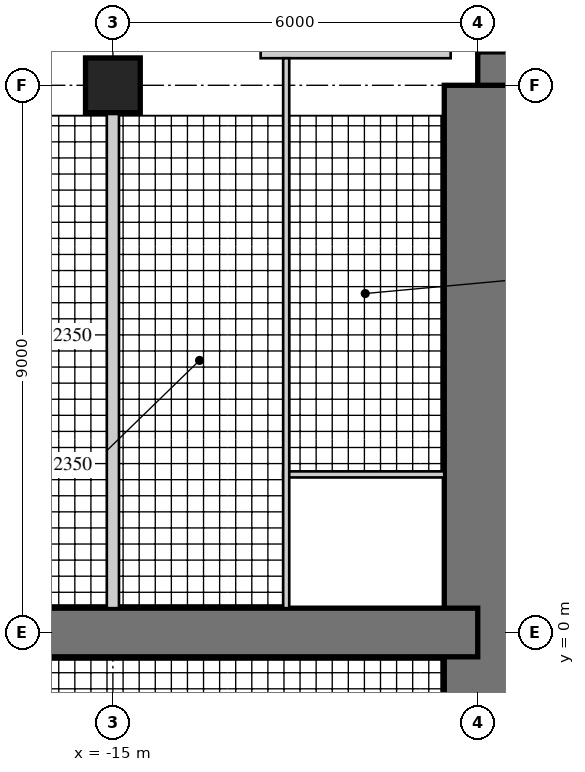
"""IFC4 building model, lengths in metres.
Left out: names, types, materials, properties, quantities, classifications, styles, units other than length and angle.
Written with IfcOpenShell. Run it as: python <this file> out.ifc"""

import sys

from ifc_helpers import new_model, si_unit, direction, frame, frame_2d, origin, origin_2d, place, context, subcontext, project, spatial, rectangle, hollow_rectangle, extrude, element, fill, save


model = new_model("IFC4")
c1 = context("Model", 3, precision=1e-05, world=origin(), true_north=direction((0.0, 1.0)))
c2 = subcontext(c1, "Body", "Model", "MODEL_VIEW")
j1 = project(units=[si_unit("LENGTHUNIT", "METRE"), si_unit("PLANEANGLEUNIT", "RADIAN")], contexts=[c1])
p1 = place(None, origin())
s1 = spatial("IfcSite", under=j1, at=p1, CompositionType="ELEMENT")
p2 = place(p1, origin())
s2 = spatial("IfcBuilding", under=s1, at=p2, CompositionType="ELEMENT")
p3 = place(p2, frame((0.0, 0.0, 179.7)))
s3 = spatial("IfcBuildingStorey", under=s2, at=p3, CompositionType="ELEMENT", Elevation=179.7)
p4 = place(p3, frame((9.0, 9.0, 0.0), z_axis=(0.0, 0.0, 1.0), x_axis=(-1.0, 0.0, 0.0)))
e1 = element("IfcWall", 1, at=p4, inside=s3, PredefinedType="SHEAR", context=c2, shape_type="SweptSolid", body=[
    extrude(rectangle(XDim=18.0, YDim=1.1, at=frame_2d((9.0, 0.0))), origin(), (0.0, 0.0, 1.0), 3.4),
])
p5 = place(p4, frame((9.8, 0.0, 0.0)))
e2 = element("IfcOpeningElement", 2, at=p5, cuts=e1, PredefinedType="OPENING", context=c2, shape_type="SweptSolid", body=[
    extrude(rectangle(XDim=1.0, YDim=2.4, at=frame_2d((0.5, 1.2))), frame((0.0, 0.56, 0.0), z_axis=(0.0, -1.0, 0.0), x_axis=(1.0, 0.0, 0.0)), (0.0, 0.0, 1.0), 1.12),
])
p6 = place(p3, frame((-9.0, 9.0, 0.0), z_axis=(0.0, 0.0, 1.0), x_axis=(0.0, -1.0, 0.0)))
e3 = element("IfcWall", 3, at=p6, inside=s3, PredefinedType="SHEAR", context=c2, shape_type="SweptSolid", body=[
    extrude(rectangle(XDim=18.0, YDim=1.1, at=frame_2d((9.0, 0.0))), origin(), (0.0, 0.0, 1.0), 3.4),
])
p7 = place(p6, frame((9.8, 0.0, 0.0)))
e4 = element("IfcOpeningElement", 4, at=p7, cuts=e3, PredefinedType="OPENING", context=c2, shape_type="SweptSolid", body=[
    extrude(rectangle(XDim=1.0, YDim=2.4, at=frame_2d((0.5, 1.2))), frame((0.0, 0.56, 0.0), z_axis=(0.0, -1.0, 0.0), x_axis=(1.0, 0.0, 0.0)), (0.0, 0.0, 1.0), 1.12),
])
p8 = place(p3, frame((-9.0, 0.0, 0.0), z_axis=(0.0, 0.0, 1.0), x_axis=(-1.0, 0.0, 0.0)))
e5 = element("IfcWall", 5, at=p8, inside=s3, PredefinedType="SHEAR", context=c2, shape_type="SweptSolid", body=[
    extrude(rectangle(XDim=18.0, YDim=0.8, at=frame_2d((9.0, 0.0))), origin(), (0.0, 0.0, 1.0), 3.4),
])
p9 = place(p8, frame((3.95, 0.0, 0.0)))
e6 = element("IfcOpeningElement", 6, at=p9, cuts=e5, PredefinedType="OPENING", context=c2, shape_type="SweptSolid", body=[
    extrude(rectangle(XDim=1.0, YDim=2.15, at=frame_2d((0.5, 1.075))), frame((0.0, 0.41, 0.0), z_axis=(0.0, -1.0, 0.0), x_axis=(1.0, 0.0, 0.0)), (0.0, 0.0, 1.0), 0.82),
])
p10 = place(p8, frame((6.6, 0.0, 0.0)))
e7 = element("IfcOpeningElement", 7, at=p10, cuts=e5, PredefinedType="OPENING", context=c2, shape_type="SweptSolid", body=[
    extrude(rectangle(XDim=1.0, YDim=2.15, at=frame_2d((0.5, 1.075))), frame((0.0, 0.41, 0.0), z_axis=(0.0, -1.0, 0.0), x_axis=(1.0, 0.0, 0.0)), (0.0, 0.0, 1.0), 0.82),
])
p11 = place(p8, frame((13.25, 0.0, 0.0)))
e8 = element("IfcOpeningElement", 8, at=p11, cuts=e5, PredefinedType="OPENING", context=c2, shape_type="SweptSolid", body=[
    extrude(rectangle(XDim=1.0, YDim=2.2, at=frame_2d((0.5, 1.1))), frame((0.0, 0.41, 0.0), z_axis=(0.0, -1.0, 0.0), x_axis=(1.0, 0.0, 0.0)), (0.0, 0.0, 1.0), 0.82),
])
p12 = place(p3, frame((-15.0, 9.0, 0.0), z_axis=(0.0, 0.0, 1.0), x_axis=(1.0, 0.0, 0.0)))
e9 = element("IfcColumn", 9, at=p12, inside=s3, PredefinedType="COLUMN", context=c2, shape_type="SweptSolid", body=[
    extrude(rectangle(XDim=0.9, YDim=0.9, at=origin_2d()), origin(), (0.0, 0.0, 1.0), 3.4),
])
p13 = place(p3, frame((-9.445, 9.57, 0.0), z_axis=(0.0, 0.0, 1.0), x_axis=(-1.0, 0.0, 0.0)))
e10 = element("IfcWall", 10, at=p13, inside=s3, PredefinedType="SOLIDWALL", context=c2, shape_type="SweptSolid", body=[
    extrude(rectangle(XDim=3.125, YDim=0.25, at=frame_2d((1.562, 0.0))), origin(), (0.0, 0.0, 1.0), 3.22),
])
p14 = place(p13, frame((0.6, 0.0, 0.0)))
e11 = element("IfcOpeningElement", 11, at=p14, cuts=e10, PredefinedType="OPENING", context=c2, shape_type="SweptSolid", body=[
    extrude(rectangle(XDim=1.0, YDim=2.2, at=frame_2d((0.5, 1.1))), frame((0.0, 0.135, 0.0), z_axis=(0.0, -1.0, 0.0), x_axis=(1.0, 0.0, 0.0)), (0.0, 0.0, 1.0), 0.27),
])
p15 = place(p3, frame((-9.55, 2.6, 0.0), z_axis=(0.0, 0.0, 1.0), x_axis=(-1.0, 0.0, 0.0)))
e12 = element("IfcWall", 12, at=p15, inside=s3, PredefinedType="PARTITIONING", context=c2, shape_type="SweptSolid", body=[
    extrude(rectangle(XDim=2.65, YDim=0.1, at=frame_2d((1.325, 0.0))), origin(), (0.0, 0.0, 1.0), 3.22),
])
p16 = place(p3, frame((-12.15, 9.445, 0.0), z_axis=(0.0, 0.0, 1.0), x_axis=(0.0, -1.0, 0.0)))
e13 = element("IfcWall", 13, at=p16, inside=s3, PredefinedType="PARTITIONING", context=c2, shape_type="SweptSolid", body=[
    extrude(rectangle(XDim=9.045, YDim=0.1, at=frame_2d((4.522, 0.0))), origin(), (0.0, 0.0, 1.0), 3.22),
])
p17 = place(p16, frame((5.495, 0.0, 0.0)))
e14 = element("IfcOpeningElement", 14, at=p17, cuts=e13, PredefinedType="OPENING", context=c2, shape_type="SweptSolid", body=[
    extrude(rectangle(XDim=0.9, YDim=2.1, at=frame_2d((0.45, 1.05))), frame((0.0, 0.06, 0.0), z_axis=(0.0, -1.0, 0.0), x_axis=(1.0, 0.0, 0.0)), (0.0, 0.0, 1.0), 0.12),
])
p18 = place(p16, frame((7.595, 0.0, 0.0)))
e15 = element("IfcOpeningElement", 15, at=p18, cuts=e13, PredefinedType="OPENING", context=c2, shape_type="SweptSolid", body=[
    extrude(rectangle(XDim=0.9, YDim=2.1, at=frame_2d((0.45, 1.05))), frame((0.0, 0.06, 0.0), z_axis=(0.0, -1.0, 0.0), x_axis=(1.0, 0.0, 0.0)), (0.0, 0.0, 1.0), 0.12),
])
p19 = place(p3, frame((-15.0, 8.55, 0.0), z_axis=(0.0, 0.0, 1.0), x_axis=(0.0, -1.0, 0.0)))
e16 = element("IfcWall", 16, at=p19, inside=s3, PredefinedType="SOLIDWALL", context=c2, shape_type="SweptSolid", body=[
    extrude(rectangle(XDim=8.15, YDim=0.2, at=frame_2d((4.075, 0.0))), origin(), (0.0, 0.0, 1.0), 2.47),
])
p20 = place(p14, origin())
e17 = element("IfcDoor", 17, at=p20, inside=s3, OperationType="SINGLE_SWING_LEFT", PredefinedType="DOOR", context=c2, shape_type="SweptSolid", body=[
    extrude(hollow_rectangle(XDim=1.0, YDim=2.2, WallThickness=0.06, at=frame_2d((0.5, 1.1))), frame((0.0, 0.025, 0.0), z_axis=(0.0, -1.0, 0.0), x_axis=(1.0, 0.0, 0.0)), (0.0, 0.0, 1.0), 0.05),
    extrude(rectangle(XDim=0.879, YDim=2.079, at=frame_2d((0.5, 1.1))), frame((0.0, 0.025, 0.0), z_axis=(0.0, -1.0, 0.0), x_axis=(1.0, 0.0, 0.0)), (0.0, 0.0, 1.0), 0.05),
])
fill(e11, e17)
p21 = place(p17, origin())
e18 = element("IfcDoor", 18, at=p21, inside=s3, OperationType="SINGLE_SWING_RIGHT", PredefinedType="DOOR", context=c2, shape_type="SweptSolid", body=[
    extrude(rectangle(XDim=0.9, YDim=2.1, at=frame_2d((0.45, 1.05))), frame((0.0, 0.025, 0.0), z_axis=(0.0, -1.0, 0.0), x_axis=(1.0, 0.0, 0.0)), (0.0, 0.0, 1.0), 0.05),
])
fill(e14, e18)
p22 = place(p18, origin())
e19 = element("IfcDoor", 19, at=p22, inside=s3, OperationType="SINGLE_SWING_RIGHT", PredefinedType="DOOR", context=c2, shape_type="SweptSolid", body=[
    extrude(rectangle(XDim=0.9, YDim=2.1, at=frame_2d((0.45, 1.05))), frame((0.0, 0.025, 0.0), z_axis=(0.0, -1.0, 0.0), x_axis=(1.0, 0.0, 0.0)), (0.0, 0.0, 1.0), 0.05),
])
fill(e15, e19)
p23 = place(p9, frame((1.0, 0.0, 0.0), z_axis=(0.0, 0.0, 1.0), x_axis=(-1.0, 0.0, 0.0)))
e20 = element("IfcDoor", 20, at=p23, inside=s3, OperationType="SINGLE_SWING_RIGHT", PredefinedType="DOOR", context=c2, shape_type="SweptSolid", body=[
    extrude(rectangle(XDim=1.0, YDim=2.15, at=frame_2d((0.5, 1.075))), frame((0.0, 0.025, 0.0), z_axis=(0.0, -1.0, 0.0), x_axis=(1.0, 0.0, 0.0)), (0.0, 0.0, 1.0), 0.05),
])
fill(e6, e20)
p24 = place(p10, frame((1.0, 0.0, 0.0), z_axis=(0.0, 0.0, 1.0), x_axis=(-1.0, 0.0, 0.0)))
e21 = element("IfcDoor", 21, at=p24, inside=s3, OperationType="SINGLE_SWING_RIGHT", PredefinedType="DOOR", context=c2, shape_type="SweptSolid", body=[
    extrude(rectangle(XDim=1.0, YDim=2.15, at=frame_2d((0.5, 1.075))), frame((0.0, 0.025, 0.0), z_axis=(0.0, -1.0, 0.0), x_axis=(1.0, 0.0, 0.0)), (0.0, 0.0, 1.0), 0.05),
])
fill(e7, e21)
p25 = place(p7, origin())
e22 = element("IfcDoor", 22, at=p25, inside=s3, OperationType="SINGLE_SWING_RIGHT", PredefinedType="DOOR", context=c2, shape_type="SweptSolid", body=[
    extrude(rectangle(XDim=1.0, YDim=2.4, at=frame_2d((0.5, 1.2))), frame((0.0, 0.055, 0.0), z_axis=(0.0, -1.0, 0.0), x_axis=(1.0, 0.0, 0.0)), (0.0, 0.0, 1.0), 0.05),
])
fill(e4, e22)
save(model, sys.argv[1])
